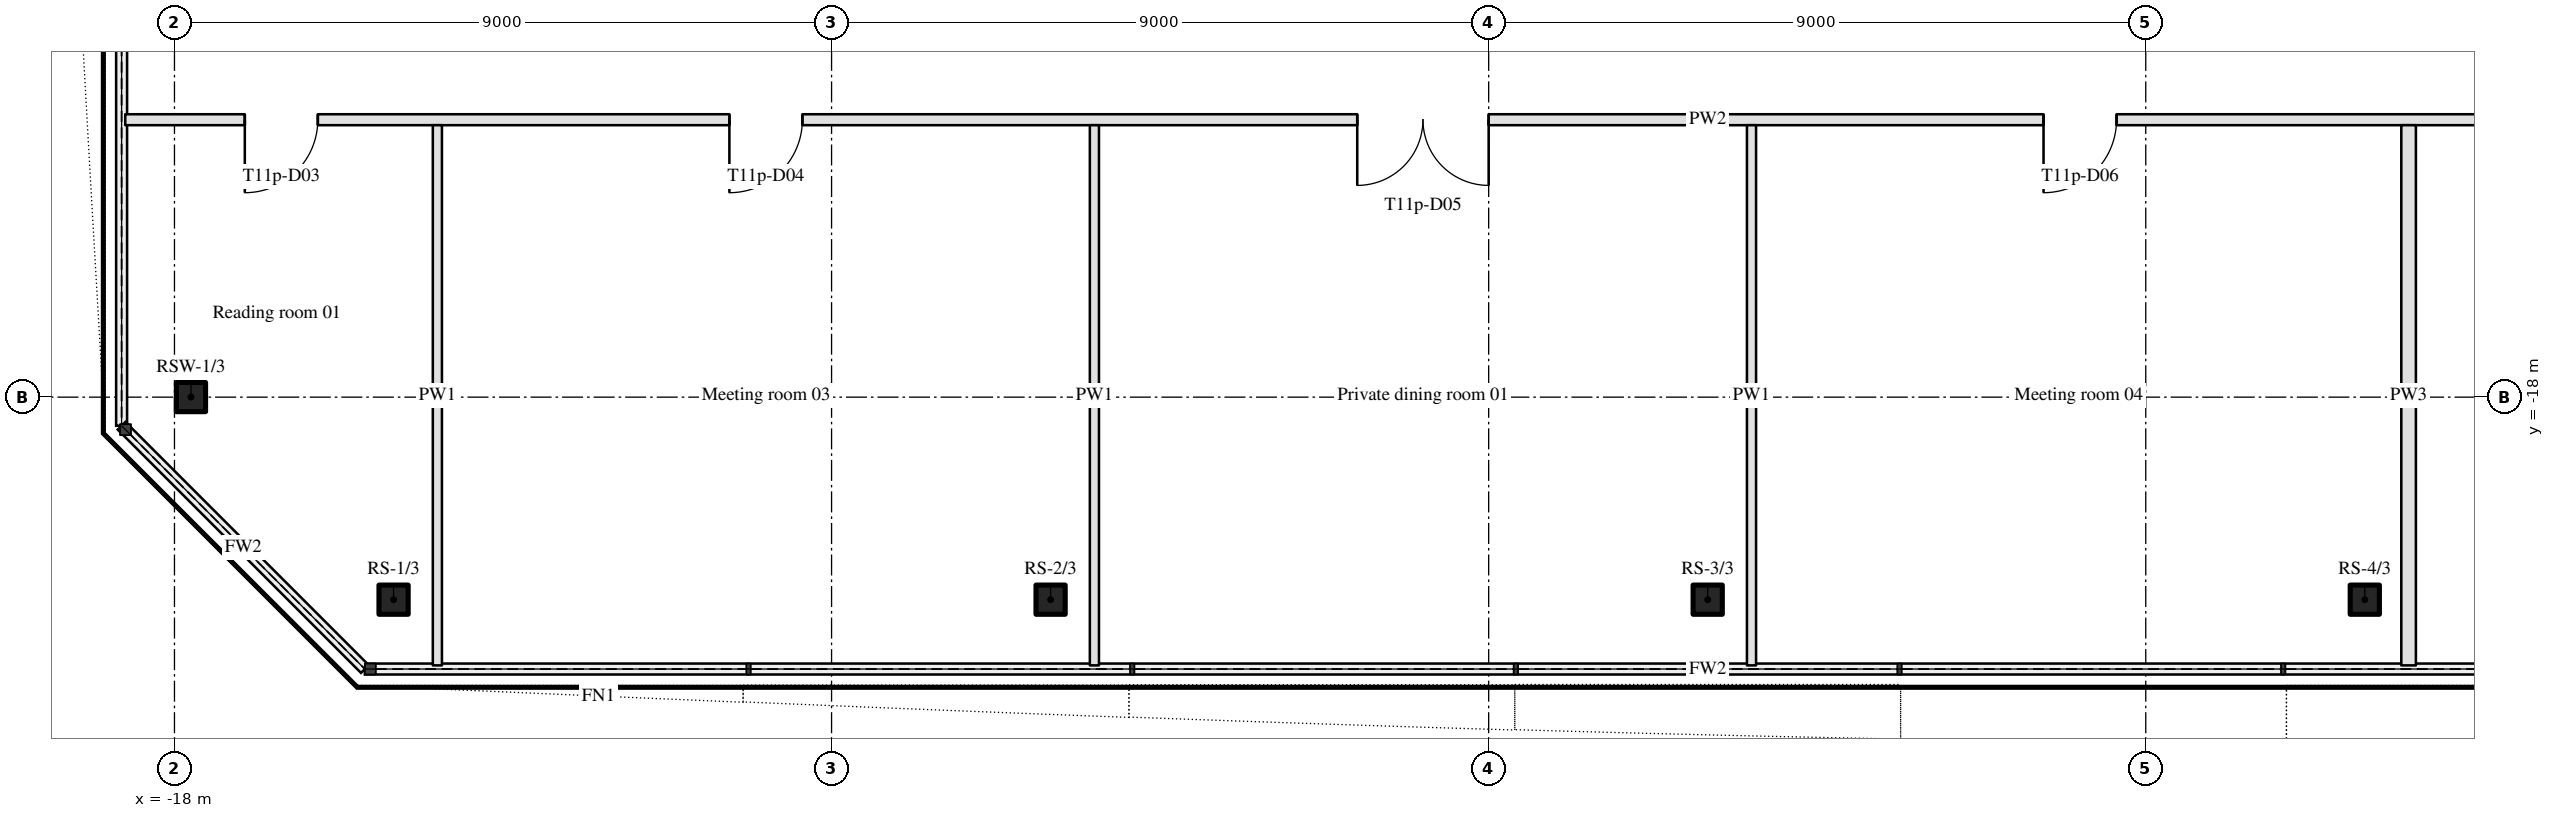
"""IFC4 building model, lengths in metres.
Left out: names, types, materials, properties, quantities, classifications, styles, units other than length and angle.
Written with IfcOpenShell. Run it as: python <this file> out.ifc"""

import sys

from ifc_helpers import new_model, si_unit, direction, frame, frame_2d, origin, origin_2d, place, context, subcontext, project, spatial, rectangle, hollow_rectangle, extrude, element, fill, save


model = new_model("IFC4")
c1 = context("Model", 3, precision=1e-05, world=origin(), true_north=direction((0.0, 1.0)))
c2 = subcontext(c1, "Body", "Model", "MODEL_VIEW")
j1 = project(units=[si_unit("LENGTHUNIT", "METRE"), si_unit("PLANEANGLEUNIT", "RADIAN")], contexts=[c1])
p1 = place(None, origin())
s1 = spatial("IfcSite", under=j1, at=p1, CompositionType="ELEMENT")
p2 = place(p1, origin())
s2 = spatial("IfcBuilding", under=s1, at=p2, CompositionType="ELEMENT")
p3 = place(p2, frame((0.0, 0.0, 158.9)))
s3 = spatial("IfcBuildingStorey", under=s2, at=p3, CompositionType="ELEMENT", Elevation=158.9)
for number, where, z_axis, x_axis in (
    (1, (-14.999, -20.774, 0.0), (0.0, 0.0, 1.0), (1.0, 0.0, 0.0)),
    (2, (-6.0, -20.774, 0.0), (0.0, 0.0, 1.0), (1.0, 0.0, 0.0)),
    (3, (3.0, -20.774, 0.0), (0.0, 0.0, 1.0), (1.0, 0.0, 0.0)),
    (4, (12.0, -20.774, 0.0), (0.0, 0.0, 1.0), (1.0, 0.0, 0.0)),
    (5, (-17.774, -17.999, 0.0), (0.0, 0.0, 1.0), (1.0, 0.0, 0.0)),
):
    element("IfcColumn", number, at=place(p3, frame(where, z_axis=z_axis, x_axis=x_axis)), inside=s3, PredefinedType="COLUMN", context=c2, shape_type="SweptSolid", body=[
        extrude(hollow_rectangle(XDim=0.4, YDim=0.4, WallThickness=0.02, InnerFilletRadius=0.03, OuterFilletRadius=0.05, at=origin_2d()), origin(), (0.0, 0.0, 1.0), 3.4),
    ])
p4 = place(p3, frame((24.674, -14.2, 0.0), z_axis=(0.0, 0.0, 1.0), x_axis=(-1.0, 0.0, 0.0)))
e6 = element("IfcWall", 6, at=p4, inside=s3, PredefinedType="PARTITIONING", context=c2, shape_type="SweptSolid", body=[
    extrude(rectangle(XDim=43.348, YDim=0.15, at=frame_2d((21.674, 0.0))), origin(), (0.0, 0.0, 1.0), 2.46),
])
p5 = place(p4, frame((40.71, 0.0, 0.0)))
e7 = element("IfcOpeningElement", 7, at=p5, cuts=e6, PredefinedType="OPENING", context=c2, shape_type="SweptSolid", body=[
    extrude(rectangle(XDim=1.0, YDim=2.1, at=frame_2d((0.5, 1.05))), frame((0.0, 0.085, 0.0), z_axis=(0.0, -1.0, 0.0), x_axis=(1.0, 0.0, 0.0)), (0.0, 0.0, 1.0), 0.17),
])
p6 = place(p4, frame((34.073, 0.0, 0.0)))
e8 = element("IfcOpeningElement", 8, at=p6, cuts=e6, PredefinedType="OPENING", context=c2, shape_type="SweptSolid", body=[
    extrude(rectangle(XDim=1.0, YDim=2.1, at=frame_2d((0.5, 1.05))), frame((0.0, 0.085, 0.0), z_axis=(0.0, -1.0, 0.0), x_axis=(1.0, 0.0, 0.0)), (0.0, 0.0, 1.0), 0.17),
])
p7 = place(p4, frame((24.674, 0.0, 0.0)))
e9 = element("IfcOpeningElement", 9, at=p7, cuts=e6, PredefinedType="OPENING", context=c2, shape_type="SweptSolid", body=[
    extrude(rectangle(XDim=1.8, YDim=2.1, at=frame_2d((0.9, 1.05))), frame((0.0, 0.085, 0.0), z_axis=(0.0, -1.0, 0.0), x_axis=(1.0, 0.0, 0.0)), (0.0, 0.0, 1.0), 0.17),
])
p8 = place(p4, frame((16.074, 0.0, 0.0)))
e10 = element("IfcOpeningElement", 10, at=p8, cuts=e6, PredefinedType="OPENING", context=c2, shape_type="SweptSolid", body=[
    extrude(rectangle(XDim=1.0, YDim=2.1, at=frame_2d((0.5, 1.05))), frame((0.0, 0.085, 0.0), z_axis=(0.0, -1.0, 0.0), x_axis=(1.0, 0.0, 0.0)), (0.0, 0.0, 1.0), 0.17),
])
p9 = place(p4, frame((8.975, 0.0, 0.0)))
e11 = element("IfcOpeningElement", 11, at=p9, cuts=e6, PredefinedType="OPENING", context=c2, shape_type="SweptSolid", body=[
    extrude(rectangle(XDim=1.8, YDim=2.1, at=frame_2d((0.9, 1.05))), frame((0.0, 0.085, 0.0), z_axis=(0.0, -1.0, 0.0), x_axis=(1.0, 0.0, 0.0)), (0.0, 0.0, 1.0), 0.17),
])
p10 = place(p4, frame((1.087, 0.0, 0.0)))
e12 = element("IfcOpeningElement", 12, at=p10, cuts=e6, PredefinedType="OPENING", context=c2, shape_type="SweptSolid", body=[
    extrude(rectangle(XDim=0.9, YDim=2.1, at=frame_2d((0.45, 1.05))), frame((0.0, 0.085, 0.0), z_axis=(0.0, -1.0, 0.0), x_axis=(1.0, 0.0, 0.0)), (0.0, 0.0, 1.0), 0.17),
])
for number, where, z_axis, x_axis in (
    (13, (-14.399, -21.674, 0.0), (0.0, 0.0, 1.0), (0.0, 1.0, 0.0)),
    (14, (-5.4, -21.674, 0.0), (0.0, 0.0, 1.0), (0.0, 1.0, 0.0)),
    (15, (3.6, -21.674, 0.0), (0.0, 0.0, 1.0), (0.0, 1.0, 0.0)),
):
    element("IfcWall", number, at=place(p3, frame(where, z_axis=z_axis, x_axis=x_axis)), inside=s3, PredefinedType="PARTITIONING", context=c2, shape_type="SweptSolid", body=[
        extrude(rectangle(XDim=7.399, YDim=0.125, at=frame_2d((3.7, 0.0))), origin(), (0.0, 0.0, 1.0), 2.46),
    ])
p11 = place(p3, frame((12.6, -21.674, 0.0), z_axis=(0.0, 0.0, 1.0), x_axis=(0.0, 1.0, 0.0)))
e16 = element("IfcWall", 16, at=p11, inside=s3, PredefinedType="PARTITIONING", context=c2, shape_type="SweptSolid", body=[
    extrude(rectangle(XDim=7.399, YDim=0.2, at=frame_2d((3.7, 0.0))), origin(), (0.0, 0.0, 1.0), 2.46),
])
p12 = place(p5, origin())
e17 = element("IfcDoor", 17, at=p12, inside=s3, OperationType="SINGLE_SWING_RIGHT", PredefinedType="DOOR", context=c2, shape_type="SweptSolid", body=[
    extrude(rectangle(XDim=1.0, YDim=2.1, at=frame_2d((0.5, 1.05))), frame((0.0, 0.025, 0.0), z_axis=(0.0, -1.0, 0.0), x_axis=(1.0, 0.0, 0.0)), (0.0, 0.0, 1.0), 0.05),
])
fill(e7, e17)
p13 = place(p6, origin())
e18 = element("IfcDoor", 18, at=p13, inside=s3, OperationType="SINGLE_SWING_RIGHT", PredefinedType="DOOR", context=c2, shape_type="SweptSolid", body=[
    extrude(rectangle(XDim=1.0, YDim=2.1, at=frame_2d((0.5, 1.05))), frame((0.0, 0.025, 0.0), z_axis=(0.0, -1.0, 0.0), x_axis=(1.0, 0.0, 0.0)), (0.0, 0.0, 1.0), 0.05),
])
fill(e8, e18)
p14 = place(p7, origin())
e19 = element("IfcDoor", 19, at=p14, inside=s3, OperationType="DOUBLE_DOOR_SINGLE_SWING", PredefinedType="DOOR", context=c2, shape_type="SweptSolid", body=[
    extrude(rectangle(XDim=1.8, YDim=2.1, at=frame_2d((0.9, 1.05))), frame((0.0, 0.025, 0.0), z_axis=(0.0, -1.0, 0.0), x_axis=(1.0, 0.0, 0.0)), (0.0, 0.0, 1.0), 0.05),
])
fill(e9, e19)
p15 = place(p8, origin())
e20 = element("IfcDoor", 20, at=p15, inside=s3, OperationType="SINGLE_SWING_RIGHT", PredefinedType="DOOR", context=c2, shape_type="SweptSolid", body=[
    extrude(rectangle(XDim=1.0, YDim=2.1, at=frame_2d((0.5, 1.05))), frame((0.0, 0.025, 0.0), z_axis=(0.0, -1.0, 0.0), x_axis=(1.0, 0.0, 0.0)), (0.0, 0.0, 1.0), 0.05),
])
fill(e10, e20)
save(model, sys.argv[1])
